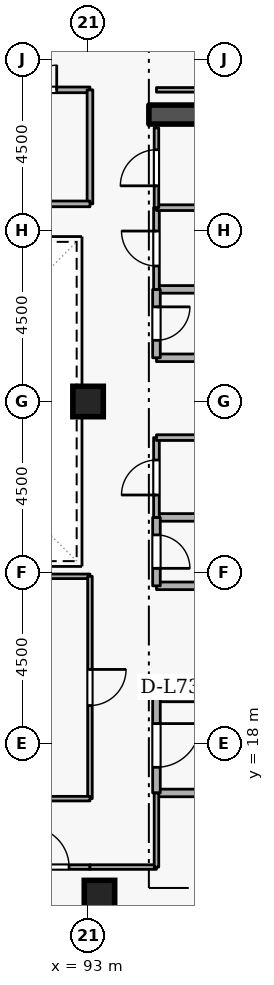
"""IFC4 building model, lengths in metres.
Left out: names, types, materials, properties, quantities, classifications, styles, units other than length and angle.
Written with IfcOpenShell. Run it as: python <this file> out.ifc"""

import sys

from ifc_helpers import new_model, si_unit, direction, frame, frame_2d, origin, origin_2d, place, context, subcontext, project, spatial, rectangle, extrude, element, fill, save


model = new_model("IFC4")
c1 = context("Model", 3, precision=1e-05, world=origin(), true_north=direction((0.0, 1.0)))
c2 = subcontext(c1, "Body", "Model", "MODEL_VIEW")
j1 = project(units=[si_unit("LENGTHUNIT", "METRE"), si_unit("PLANEANGLEUNIT", "RADIAN")], contexts=[c1])
p1 = place(None, origin())
s1 = spatial("IfcSite", under=j1, at=p1, CompositionType="ELEMENT")
p2 = place(p1, origin())
s2 = spatial("IfcBuilding", under=s1, at=p2, CompositionType="ELEMENT")
p3 = place(p2, frame((0.0, 0.0, 272.7)))
s3 = spatial("IfcBuildingStorey", under=s2, at=p3, CompositionType="ELEMENT", Elevation=272.7)
p4 = place(p3, frame((94.6, 34.55, 0.0), z_axis=(0.0, 0.0, 1.0), x_axis=(1.0, 0.0, 0.0)))
e1 = element("IfcWall", 1, at=p4, inside=s3, PredefinedType="SHEAR", context=c2, shape_type="SweptSolid", body=[
    extrude(rectangle(XDim=5.8, YDim=0.5, at=frame_2d((2.9, 0.0))), origin(), (0.0, 0.0, 1.0), 3.6),
])
for number, where, z_axis, x_axis in (
    (2, (93.3, 14.0, 0.0), (0.0, 0.0, 1.0), (1.0, 0.0, 0.0)),
    (3, (93.0, 27.0, 0.0), (0.0, 0.0, 1.0), (1.0, 0.0, 0.0)),
):
    element("IfcColumn", number, at=place(p3, frame(where, z_axis=z_axis, x_axis=x_axis)), inside=s3, PredefinedType="COLUMN", context=c2, shape_type="SweptSolid", body=[
        extrude(rectangle(XDim=0.8, YDim=0.8, at=origin_2d()), origin(), (0.0, 0.0, 1.0), 3.6),
    ])
p5 = place(p3, frame((94.8, 16.7, 0.0), z_axis=(0.0, 0.0, 1.0), x_axis=(1.0, 0.0, 0.0)))
e4 = element("IfcWall", 4, at=p5, inside=s3, PredefinedType="STANDARD", context=c2, shape_type="SweptSolid", body=[
    extrude(rectangle(XDim=5.7, YDim=0.2, at=frame_2d((2.85, 0.0))), origin(), (0.0, 0.0, 1.0), 3.34),
])
p6 = place(p3, frame((97.1, 19.2, 0.0), z_axis=(0.0, 0.0, 1.0), x_axis=(-1.0, 0.0, 0.0)))
e5 = element("IfcWall", 5, at=p6, inside=s3, PredefinedType="STANDARD", context=c2, shape_type="SweptSolid", body=[
    extrude(rectangle(XDim=2.3, YDim=0.2, at=frame_2d((1.15, 0.0))), origin(), (0.0, 0.0, 1.0), 2.545),
])
p7 = place(p3, frame((94.8, 19.2, 0.0), z_axis=(0.0, 0.0, 1.0), x_axis=(0.0, -1.0, 0.0)))
e6 = element("IfcWall", 6, at=p7, inside=s3, PredefinedType="STANDARD", context=c2, shape_type="SweptSolid", body=[
    extrude(rectangle(XDim=2.5, YDim=0.2, at=frame_2d((1.25, 0.0))), origin(), (0.0, 0.0, 1.0), 3.34),
])
p8 = place(p7, frame((0.675, 0.0, 0.0)))
e7 = element("IfcOpeningElement", 7, at=p8, cuts=e6, PredefinedType="OPENING", context=c2, shape_type="SweptSolid", body=[
    extrude(rectangle(XDim=1.15, YDim=2.1, at=frame_2d((0.575, 1.05))), frame((0.0, 0.11, 0.0), z_axis=(0.0, -1.0, 0.0), x_axis=(1.0, 0.0, 0.0)), (0.0, 0.0, 1.0), 0.22),
])
for number, where, z_axis, x_axis in (
    (8, (94.8, 28.15, 0.0), (0.0, 0.0, 1.0), (1.0, 0.0, 0.0)),
    (9, (96.85, 29.95, 0.0), (0.0, 0.0, 1.0), (-1.0, 0.0, 0.0)),
):
    element("IfcWall", number, at=place(p3, frame(where, z_axis=z_axis, x_axis=x_axis)), inside=s3, PredefinedType="STANDARD", context=c2, shape_type="SweptSolid", body=[
        extrude(rectangle(XDim=2.05, YDim=0.2, at=frame_2d((1.025, 0.0))), origin(), (0.0, 0.0, 1.0), 3.34),
    ])
p9 = place(p3, frame((94.8, 29.95, 0.0), z_axis=(0.0, 0.0, 1.0), x_axis=(0.0, -1.0, 0.0)))
e10 = element("IfcWall", 10, at=p9, inside=s3, PredefinedType="STANDARD", context=c2, shape_type="SweptSolid", body=[
    extrude(rectangle(XDim=1.8, YDim=0.2, at=frame_2d((0.9, 0.0))), origin(), (0.0, 0.0, 1.0), 3.34),
])
p10 = place(p9, frame((0.46, 0.0, 0.0)))
e11 = element("IfcOpeningElement", 11, at=p10, cuts=e10, PredefinedType="OPENING", context=c2, shape_type="SweptSolid", body=[
    extrude(rectangle(XDim=0.88, YDim=2.04, at=frame_2d((0.44, 1.02))), frame((0.0, 0.11, 0.0), z_axis=(0.0, -1.0, 0.0), x_axis=(1.0, 0.0, 0.0)), (0.0, 0.0, 1.0), 0.22),
])
for number, where, z_axis, x_axis in (
    (12, (94.8, 22.15, 0.0), (0.0, 0.0, 1.0), (1.0, 0.0, 0.0)),
    (13, (96.85, 23.95, 0.0), (0.0, 0.0, 1.0), (-1.0, 0.0, 0.0)),
):
    element("IfcWall", number, at=place(p3, frame(where, z_axis=z_axis, x_axis=x_axis)), inside=s3, PredefinedType="STANDARD", context=c2, shape_type="SweptSolid", body=[
        extrude(rectangle(XDim=2.05, YDim=0.2, at=frame_2d((1.025, 0.0))), origin(), (0.0, 0.0, 1.0), 3.34),
    ])
p11 = place(p3, frame((94.8, 23.95, 0.0), z_axis=(0.0, 0.0, 1.0), x_axis=(0.0, -1.0, 0.0)))
e14 = element("IfcWall", 14, at=p11, inside=s3, PredefinedType="STANDARD", context=c2, shape_type="SweptSolid", body=[
    extrude(rectangle(XDim=1.8, YDim=0.2, at=frame_2d((0.9, 0.0))), origin(), (0.0, 0.0, 1.0), 3.34),
])
p12 = place(p11, frame((0.46, 0.0, 0.0)))
e15 = element("IfcOpeningElement", 15, at=p12, cuts=e14, PredefinedType="OPENING", context=c2, shape_type="SweptSolid", body=[
    extrude(rectangle(XDim=0.88, YDim=2.04, at=frame_2d((0.44, 1.02))), frame((0.0, 0.11, 0.0), z_axis=(0.0, -1.0, 0.0), x_axis=(1.0, 0.0, 0.0)), (0.0, 0.0, 1.0), 0.22),
])
p13 = place(p3, frame((94.8, 23.95, 0.0), z_axis=(0.0, 0.0, 1.0), x_axis=(0.0, 1.0, 0.0)))
e16 = element("IfcWall", 16, at=p13, inside=s3, PredefinedType="PARTITIONING", context=c2, shape_type="SweptSolid", body=[
    extrude(rectangle(XDim=2.1, YDim=0.15, at=frame_2d((1.05, 0.0))), origin(), (0.0, 0.0, 1.0), 3.34),
])
p14 = place(p13, frame((0.59, 0.0, 0.0)))
e17 = element("IfcOpeningElement", 17, at=p14, cuts=e16, PredefinedType="OPENING", context=c2, shape_type="SweptSolid", body=[
    extrude(rectangle(XDim=0.92, YDim=2.08, at=frame_2d((0.46, 1.04))), frame((0.0, 0.085, 0.0), z_axis=(0.0, -1.0, 0.0), x_axis=(1.0, 0.0, 0.0)), (0.0, 0.0, 1.0), 0.17),
])
p15 = place(p3, frame((94.8, 26.05, 0.0), z_axis=(0.0, 0.0, 1.0), x_axis=(1.0, 0.0, 0.0)))
e18 = element("IfcWall", 18, at=p15, inside=s3, PredefinedType="PARTITIONING", context=c2, shape_type="SweptSolid", body=[
    extrude(rectangle(XDim=2.05, YDim=0.15, at=frame_2d((1.025, 0.0))), origin(), (0.0, 0.0, 1.0), 3.34),
])
p16 = place(p3, frame((94.8, 29.95, 0.0), z_axis=(0.0, 0.0, 1.0), x_axis=(0.0, 1.0, 0.0)))
e19 = element("IfcWall", 19, at=p16, inside=s3, PredefinedType="PARTITIONING", context=c2, shape_type="SweptSolid", body=[
    extrude(rectangle(XDim=2.15, YDim=0.15, at=frame_2d((1.075, 0.0))), origin(), (0.0, 0.0, 1.0), 3.34),
])
p17 = place(p16, frame((0.615, 0.0, 0.0)))
e20 = element("IfcOpeningElement", 20, at=p17, cuts=e19, PredefinedType="OPENING", context=c2, shape_type="SweptSolid", body=[
    extrude(rectangle(XDim=0.92, YDim=2.08, at=frame_2d((0.46, 1.04))), frame((0.0, 0.085, 0.0), z_axis=(0.0, -1.0, 0.0), x_axis=(1.0, 0.0, 0.0)), (0.0, 0.0, 1.0), 0.17),
])
p18 = place(p3, frame((94.8, 32.1, 0.0), z_axis=(0.0, 0.0, 1.0), x_axis=(1.0, 0.0, 0.0)))
e21 = element("IfcWall", 21, at=p18, inside=s3, PredefinedType="PARTITIONING", context=c2, shape_type="SweptSolid", body=[
    extrude(rectangle(XDim=2.05, YDim=0.15, at=frame_2d((1.025, 0.0))), origin(), (0.0, 0.0, 1.0), 3.34),
])
p19 = place(p3, frame((94.8, 32.1, 0.0), z_axis=(0.0, 0.0, 1.0), x_axis=(0.0, 1.0, 0.0)))
e22 = element("IfcWall", 22, at=p19, inside=s3, PredefinedType="PARTITIONING", context=c2, shape_type="SweptSolid", body=[
    extrude(rectangle(XDim=2.1, YDim=0.12, at=frame_2d((1.05, 0.0))), origin(), (0.0, 0.0, 1.0), 3.34),
])
p20 = place(p19, frame((0.575, 0.0, 0.0)))
e23 = element("IfcOpeningElement", 23, at=p20, cuts=e22, PredefinedType="OPENING", context=c2, shape_type="SweptSolid", body=[
    extrude(rectangle(XDim=0.95, YDim=2.1, at=frame_2d((0.475, 1.05))), frame((0.0, 0.07, 0.0), z_axis=(0.0, -1.0, 0.0), x_axis=(1.0, 0.0, 0.0)), (0.0, 0.0, 1.0), 0.14),
])
p21 = place(p3, frame((94.8, 35.2, 0.0), z_axis=(0.0, 0.0, 1.0), x_axis=(1.0, 0.0, 0.0)))
e24 = element("IfcWall", 24, at=p21, inside=s3, PredefinedType="PARTITIONING", context=c2, shape_type="SweptSolid", body=[
    extrude(rectangle(XDim=5.9, YDim=0.12, at=frame_2d((2.95, 0.0))), origin(), (0.0, 0.0, 1.0), 3.34),
])
p22 = place(p3, frame((90.9, 14.75, 0.0), z_axis=(0.0, 0.0, 1.0), x_axis=(1.0, 0.0, 0.0)))
e25 = element("IfcWall", 25, at=p22, inside=s3, PredefinedType="PARTITIONING", context=c2, shape_type="SweptSolid", body=[
    extrude(rectangle(XDim=2.15, YDim=0.12, at=frame_2d((1.075, 0.0))), origin(), (0.0, 0.0, 1.0), 3.34),
])
p23 = place(p22, frame((0.55, 0.0, 0.0)))
e26 = element("IfcOpeningElement", 26, at=p23, cuts=e25, PredefinedType="OPENING", context=c2, shape_type="SweptSolid", body=[
    extrude(rectangle(XDim=1.05, YDim=2.1, at=frame_2d((0.525, 1.05))), frame((0.0, 0.07, 0.0), z_axis=(0.0, -1.0, 0.0), x_axis=(1.0, 0.0, 0.0)), (0.0, 0.0, 1.0), 0.14),
])
p24 = place(p3, frame((93.05, 14.75, 0.0), z_axis=(0.0, 0.0, 1.0), x_axis=(1.0, 0.0, 0.0)))
e27 = element("IfcWall", 27, at=p24, inside=s3, PredefinedType="PARTITIONING", context=c2, shape_type="SweptSolid", body=[
    extrude(rectangle(XDim=1.75, YDim=0.12, at=frame_2d((0.875, 0.0))), origin(), (0.0, 0.0, 1.0), 3.34),
])
p25 = place(p3, frame((94.8, 14.75, 0.0), z_axis=(0.0, 0.0, 1.0), x_axis=(0.0, 1.0, 0.0)))
e28 = element("IfcWall", 28, at=p25, inside=s3, PredefinedType="PARTITIONING", context=c2, shape_type="SweptSolid", body=[
    extrude(rectangle(XDim=1.95, YDim=0.12, at=frame_2d((0.975, 0.0))), origin(), (0.0, 0.0, 1.0), 3.34),
])
p26 = place(p3, frame((89.3, 22.4, 0.0), z_axis=(0.0, 0.0, 1.0), x_axis=(1.0, 0.0, 0.0)))
e29 = element("IfcWall", 29, at=p26, inside=s3, PredefinedType="PARTITIONING", context=c2, shape_type="SweptSolid", body=[
    extrude(rectangle(XDim=3.75, YDim=0.12, at=frame_2d((1.875, 0.0))), origin(), (0.0, 0.0, 1.0), 3.34),
])
p27 = place(p3, frame((93.05, 22.4, 0.0), z_axis=(0.0, 0.0, 1.0), x_axis=(0.0, -1.0, 0.0)))
e30 = element("IfcWall", 30, at=p27, inside=s3, PredefinedType="PARTITIONING", context=c2, shape_type="SweptSolid", body=[
    extrude(rectangle(XDim=5.85, YDim=0.12, at=frame_2d((2.925, 0.0))), origin(), (0.0, 0.0, 1.0), 3.34),
])
p28 = place(p27, frame((2.45, 0.0, 0.0)))
e31 = element("IfcOpeningElement", 31, at=p28, cuts=e30, PredefinedType="OPENING", context=c2, shape_type="SweptSolid", body=[
    extrude(rectangle(XDim=0.95, YDim=2.1, at=frame_2d((0.475, 1.05))), frame((0.0, 0.07, 0.0), z_axis=(0.0, -1.0, 0.0), x_axis=(1.0, 0.0, 0.0)), (0.0, 0.0, 1.0), 0.14),
])
p29 = place(p3, frame((93.05, 16.55, 0.0), z_axis=(0.0, 0.0, 1.0), x_axis=(-1.0, 0.0, 0.0)))
e32 = element("IfcWall", 32, at=p29, inside=s3, PredefinedType="PARTITIONING", context=c2, shape_type="SweptSolid", body=[
    extrude(rectangle(XDim=3.75, YDim=0.12, at=frame_2d((1.875, 0.0))), origin(), (0.0, 0.0, 1.0), 3.34),
])
p30 = place(p3, frame((90.0, 35.2, 0.0), z_axis=(0.0, 0.0, 1.0), x_axis=(1.0, 0.0, 0.0)))
e33 = element("IfcWall", 33, at=p30, inside=s3, PredefinedType="PARTITIONING", context=c2, shape_type="SweptSolid", body=[
    extrude(rectangle(XDim=3.05, YDim=0.15, at=frame_2d((1.525, 0.0))), origin(), (0.0, 0.0, 1.0), 3.34),
])
p31 = place(p30, frame((0.875, 0.0, 0.0)))
e34 = element("IfcOpeningElement", 34, at=p31, cuts=e33, PredefinedType="OPENING", context=c2, shape_type="SweptSolid", body=[
    extrude(rectangle(XDim=1.3, YDim=2.12, at=frame_2d((0.65, 1.06))), frame((0.0, 0.085, 0.0), z_axis=(0.0, -1.0, 0.0), x_axis=(1.0, 0.0, 0.0)), (0.0, 0.0, 1.0), 0.17),
])
p32 = place(p3, frame((93.05, 35.2, 0.0), z_axis=(0.0, 0.0, 1.0), x_axis=(0.0, -1.0, 0.0)))
e35 = element("IfcWall", 35, at=p32, inside=s3, PredefinedType="PARTITIONING", context=c2, shape_type="SweptSolid", body=[
    extrude(rectangle(XDim=3.0, YDim=0.15, at=frame_2d((1.5, 0.0))), origin(), (0.0, 0.0, 1.0), 3.34),
])
p33 = place(p3, frame((93.05, 32.2, 0.0), z_axis=(0.0, 0.0, 1.0), x_axis=(-1.0, 0.0, 0.0)))
e36 = element("IfcWall", 36, at=p33, inside=s3, PredefinedType="PARTITIONING", context=c2, shape_type="SweptSolid", body=[
    extrude(rectangle(XDim=3.05, YDim=0.15, at=frame_2d((1.525, 0.0))), origin(), (0.0, 0.0, 1.0), 3.34),
])
p34 = place(p8, origin())
e37 = element("IfcDoor", 37, at=p34, inside=s3, OperationType="SINGLE_SWING_LEFT", PredefinedType="DOOR", context=c2, shape_type="SweptSolid", body=[
    extrude(rectangle(XDim=1.15, YDim=2.1, at=frame_2d((0.575, 1.05))), frame((0.0, 0.025, 0.0), z_axis=(0.0, -1.0, 0.0), x_axis=(1.0, 0.0, 0.0)), (0.0, 0.0, 1.0), 0.05),
])
fill(e7, e37)
p35 = place(p10, origin())
e38 = element("IfcDoor", 38, at=p35, inside=s3, OperationType="SINGLE_SWING_LEFT", PredefinedType="DOOR", context=c2, shape_type="SweptSolid", body=[
    extrude(rectangle(XDim=0.88, YDim=2.04, at=frame_2d((0.44, 1.02))), frame((0.0, 0.025, 0.0), z_axis=(0.0, -1.0, 0.0), x_axis=(1.0, 0.0, 0.0)), (0.0, 0.0, 1.0), 0.05),
])
fill(e11, e38)
p36 = place(p12, origin())
e39 = element("IfcDoor", 39, at=p36, inside=s3, OperationType="SINGLE_SWING_RIGHT", PredefinedType="DOOR", context=c2, shape_type="SweptSolid", body=[
    extrude(rectangle(XDim=0.88, YDim=2.04, at=frame_2d((0.44, 1.02))), frame((0.0, 0.025, 0.0), z_axis=(0.0, -1.0, 0.0), x_axis=(1.0, 0.0, 0.0)), (0.0, 0.0, 1.0), 0.05),
])
fill(e15, e39)
p37 = place(p14, origin())
e40 = element("IfcDoor", 40, at=p37, inside=s3, OperationType="SINGLE_SWING_LEFT", PredefinedType="DOOR", context=c2, shape_type="SweptSolid", body=[
    extrude(rectangle(XDim=0.92, YDim=2.08, at=frame_2d((0.46, 1.04))), frame((0.0, 0.025, 0.0), z_axis=(0.0, -1.0, 0.0), x_axis=(1.0, 0.0, 0.0)), (0.0, 0.0, 1.0), 0.05),
])
fill(e17, e40)
p38 = place(p17, origin())
e41 = element("IfcDoor", 41, at=p38, inside=s3, OperationType="SINGLE_SWING_RIGHT", PredefinedType="DOOR", context=c2, shape_type="SweptSolid", body=[
    extrude(rectangle(XDim=0.92, YDim=2.08, at=frame_2d((0.46, 1.04))), frame((0.0, 0.025, 0.0), z_axis=(0.0, -1.0, 0.0), x_axis=(1.0, 0.0, 0.0)), (0.0, 0.0, 1.0), 0.05),
])
fill(e20, e41)
p39 = place(p20, origin())
e42 = element("IfcDoor", 42, at=p39, inside=s3, OperationType="SINGLE_SWING_LEFT", PredefinedType="DOOR", context=c2, shape_type="SweptSolid", body=[
    extrude(rectangle(XDim=0.95, YDim=2.1, at=frame_2d((0.475, 1.05))), frame((0.0, 0.025, 0.0), z_axis=(0.0, -1.0, 0.0), x_axis=(1.0, 0.0, 0.0)), (0.0, 0.0, 1.0), 0.05),
])
fill(e23, e42)
p40 = place(p23, origin())
e43 = element("IfcDoor", 43, at=p40, inside=s3, OperationType="SINGLE_SWING_LEFT", PredefinedType="DOOR", context=c2, shape_type="SweptSolid", body=[
    extrude(rectangle(XDim=1.05, YDim=2.1, at=frame_2d((0.525, 1.05))), frame((0.0, 0.025, 0.0), z_axis=(0.0, -1.0, 0.0), x_axis=(1.0, 0.0, 0.0)), (0.0, 0.0, 1.0), 0.05),
])
fill(e26, e43)
p41 = place(p28, origin())
e44 = element("IfcDoor", 44, at=p41, inside=s3, OperationType="SINGLE_SWING_LEFT", PredefinedType="DOOR", context=c2, shape_type="SweptSolid", body=[
    extrude(rectangle(XDim=0.95, YDim=2.1, at=frame_2d((0.475, 1.05))), frame((0.0, 0.025, 0.0), z_axis=(0.0, -1.0, 0.0), x_axis=(1.0, 0.0, 0.0)), (0.0, 0.0, 1.0), 0.05),
])
fill(e31, e44)
p42 = place(p31, origin())
e45 = element("IfcDoor", 45, at=p42, inside=s3, OperationType="DOUBLE_DOOR_SINGLE_SWING", PredefinedType="DOOR", context=c2, shape_type="SweptSolid", body=[
    extrude(rectangle(XDim=1.3, YDim=2.12, at=frame_2d((0.65, 1.06))), frame((0.0, 0.025, 0.0), z_axis=(0.0, -1.0, 0.0), x_axis=(1.0, 0.0, 0.0)), (0.0, 0.0, 1.0), 0.05),
])
fill(e34, e45)
save(model, sys.argv[1])
